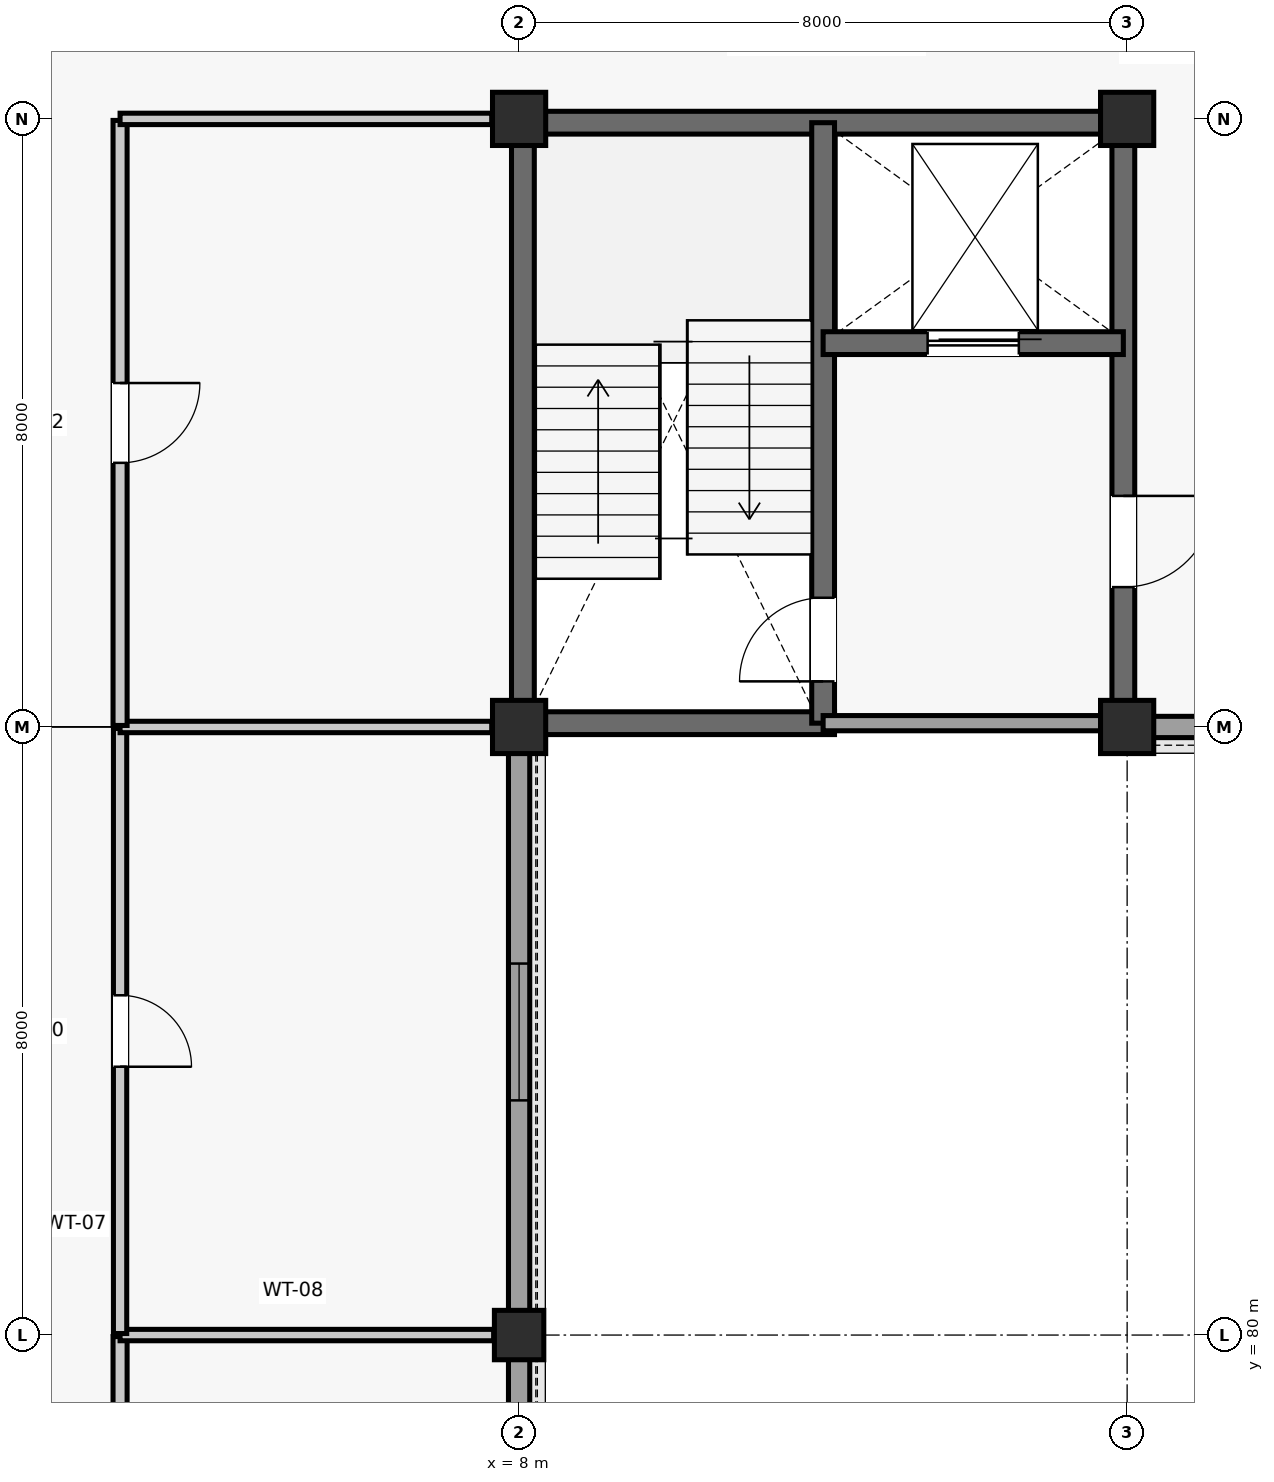
"""IFC4 building model, lengths in metres.
Left out: names, types, materials, properties, quantities, classifications, styles, units other than length and angle.
Written with IfcOpenShell. Run it as: python <this file> out.ifc"""

import sys

from ifc_helpers import new_model, si_unit, direction, frame, frame_2d, origin, origin_2d, place, context, subcontext, project, spatial, rectangle, extrude, element, fill, save


model = new_model("IFC4")
c1 = context("Model", 3, precision=1e-05, world=origin(), true_north=direction((0.0, 1.0)))
c2 = subcontext(c1, "Body", "Model", "MODEL_VIEW")
j1 = project(units=[si_unit("LENGTHUNIT", "METRE"), si_unit("PLANEANGLEUNIT", "RADIAN")], contexts=[c1])
p1 = place(None, origin())
s1 = spatial("IfcSite", under=j1, at=p1, CompositionType="ELEMENT")
p2 = place(p1, origin())
s2 = spatial("IfcBuilding", under=s1, at=p2, CompositionType="ELEMENT")
p3 = place(p2, frame((0.0, 0.0, 13.86)))
s3 = spatial("IfcBuildingStorey", under=s2, at=p3, CompositionType="ELEMENT", Elevation=13.86)
p4 = place(p3, frame((8.0, 80.0, 0.0), z_axis=(0.0, 0.0, 1.0), x_axis=(1.0, 0.0, 0.0)))
e1 = element("IfcColumn", 1, at=p4, inside=s3, PredefinedType="COLUMN", context=c2, shape_type="SweptSolid", body=[
    extrude(rectangle(XDim=0.65, YDim=0.65, at=origin_2d()), origin(), (0.0, 0.0, 1.0), 3.96),
])
for number, where, z_axis, x_axis in (
    (2, (8.0, 88.0, 0.0), (0.0, 0.0, 1.0), (1.0, 0.0, 0.0)),
    (3, (8.0, 96.0, 0.0), (0.0, 0.0, 1.0), (1.0, 0.0, 0.0)),
    (4, (16.0, 88.0, 0.0), (0.0, 0.0, 1.0), (1.0, 0.0, 0.0)),
    (5, (16.0, 96.0, 0.0), (0.0, 0.0, 1.0), (1.0, 0.0, 0.0)),
):
    element("IfcColumn", number, at=place(p3, frame(where, z_axis=z_axis, x_axis=x_axis)), inside=s3, PredefinedType="COLUMN", context=c2, shape_type="SweptSolid", body=[
        extrude(rectangle(XDim=0.7, YDim=0.7, at=origin_2d()), origin(), (0.0, 0.0, 1.0), 3.96),
    ])
p5 = place(p3, frame((8.0, 72.26, 0.0), z_axis=(0.0, 0.0, 1.0), x_axis=(0.0, 1.0, 0.0)))
e6 = element("IfcWall", 6, at=p5, inside=s3, PredefinedType="SOLIDWALL", context=c2, shape_type="SweptSolid", body=[
    extrude(rectangle(XDim=7.43, YDim=0.28, at=frame_2d((3.715, 0.0))), origin(), (0.0, 0.0, 1.0), 3.364),
])
p6 = place(p5, frame((3.115, 0.0, 0.9)))
e7 = element("IfcOpeningElement", 7, at=p6, cuts=e6, PredefinedType="OPENING", context=c2, shape_type="SweptSolid", body=[
    extrude(rectangle(XDim=1.2, YDim=1.8, at=frame_2d((0.6, 0.9))), frame((0.0, 0.15, 0.0), z_axis=(0.0, -1.0, 0.0), x_axis=(1.0, 0.0, 0.0)), (0.0, 0.0, 1.0), 0.3),
])
p7 = place(p3, frame((8.0, 80.31, 0.0), z_axis=(0.0, 0.0, 1.0), x_axis=(0.0, 1.0, 0.0)))
e8 = element("IfcWall", 8, at=p7, inside=s3, PredefinedType="SOLIDWALL", context=c2, shape_type="SweptSolid", body=[
    extrude(rectangle(XDim=7.355, YDim=0.28, at=frame_2d((3.677, 0.0))), origin(), (0.0, 0.0, 1.0), 3.304),
])
p8 = place(p7, frame((2.778, 0.0, 1.35)))
e9 = element("IfcOpeningElement", 9, at=p8, cuts=e8, PredefinedType="OPENING", context=c2, shape_type="SweptSolid", body=[
    extrude(rectangle(XDim=1.8, YDim=1.2, at=frame_2d((0.9, 0.6))), frame((0.0, 0.15, 0.0), z_axis=(0.0, -1.0, 0.0), x_axis=(1.0, 0.0, 0.0)), (0.0, 0.0, 1.0), 0.3),
])
p9 = place(p3, frame((16.335, 88.0, 0.0), z_axis=(0.0, 0.0, 1.0), x_axis=(1.0, 0.0, 0.0)))
e10 = element("IfcWall", 10, at=p9, inside=s3, PredefinedType="SOLIDWALL", context=c2, shape_type="SweptSolid", body=[
    extrude(rectangle(XDim=7.355, YDim=0.28, at=frame_2d((3.677, 0.0))), origin(), (0.0, 0.0, 1.0), 3.3),
])
p10 = place(p9, frame((0.724, 0.0, 0.95)))
e11 = element("IfcOpeningElement", 11, at=p10, cuts=e10, PredefinedType="OPENING", context=c2, shape_type="SweptSolid", body=[
    extrude(rectangle(XDim=1.2, YDim=1.8, at=frame_2d((0.6, 0.9))), frame((0.0, 0.15, 0.0), z_axis=(0.0, -1.0, 0.0), x_axis=(1.0, 0.0, 0.0)), (0.0, 0.0, 1.0), 0.3),
])
p11 = place(p9, frame((5.431, 0.0, 0.95)))
e12 = element("IfcOpeningElement", 12, at=p11, cuts=e10, PredefinedType="OPENING", context=c2, shape_type="SweptSolid", body=[
    extrude(rectangle(XDim=1.2, YDim=1.8, at=frame_2d((0.6, 0.9))), frame((0.0, 0.15, 0.0), z_axis=(0.0, -1.0, 0.0), x_axis=(1.0, 0.0, 0.0)), (0.0, 0.0, 1.0), 0.3),
])
for number, where, z_axis, x_axis in (
    (13, (8.05, 88.24, 0.0), (0.0, 0.0, 1.0), (0.0, 1.0, 0.0)),
    (14, (8.24, 95.95, 0.0), (0.0, 0.0, 1.0), (1.0, 0.0, 0.0)),
):
    element("IfcWall", number, at=place(p3, frame(where, z_axis=z_axis, x_axis=x_axis)), inside=s3, PredefinedType="SHEAR", context=c2, shape_type="SweptSolid", body=[
        extrude(rectangle(XDim=7.52, YDim=0.3, at=frame_2d((3.76, 0.0))), origin(), (0.0, 0.0, 1.0), 3.725),
    ])
p12 = place(p3, frame((15.95, 88.24, 0.0), z_axis=(0.0, 0.0, 1.0), x_axis=(0.0, 1.0, 0.0)))
e15 = element("IfcWall", 15, at=p12, inside=s3, PredefinedType="SHEAR", context=c2, shape_type="SweptSolid", body=[
    extrude(rectangle(XDim=7.52, YDim=0.3, at=frame_2d((3.76, 0.0))), origin(), (0.0, 0.0, 1.0), 3.725),
])
p13 = place(p12, frame((1.6, 0.0, 0.0)))
e16 = element("IfcOpeningElement", 16, at=p13, cuts=e15, PredefinedType="OPENING", context=c2, shape_type="SweptSolid", body=[
    extrude(rectangle(XDim=1.2, YDim=2.15, at=frame_2d((0.6, 1.075))), frame((0.0, 0.16, 0.0), z_axis=(0.0, -1.0, 0.0), x_axis=(1.0, 0.0, 0.0)), (0.0, 0.0, 1.0), 0.32),
])
p14 = place(p3, frame((8.24, 88.05, 0.0), z_axis=(0.0, 0.0, 1.0), x_axis=(1.0, 0.0, 0.0)))
e17 = element("IfcWall", 17, at=p14, inside=s3, PredefinedType="SHEAR", context=c2, shape_type="SweptSolid", body=[
    extrude(rectangle(XDim=3.91, YDim=0.3, at=frame_2d((1.955, 0.0))), origin(), (0.0, 0.0, 1.0), 3.725),
])
p15 = place(p3, frame((12.0, 88.05, 0.0), z_axis=(0.0, 0.0, 1.0), x_axis=(0.0, 1.0, 0.0)))
e18 = element("IfcWall", 18, at=p15, inside=s3, PredefinedType="SHEAR", context=c2, shape_type="SweptSolid", body=[
    extrude(rectangle(XDim=7.9, YDim=0.3, at=frame_2d((3.95, 0.0))), origin(), (0.0, 0.0, 1.0), 3.725),
])
p16 = place(p15, frame((0.55, 0.0, 0.0)))
e19 = element("IfcOpeningElement", 19, at=p16, cuts=e18, PredefinedType="OPENING", context=c2, shape_type="SweptSolid", body=[
    extrude(rectangle(XDim=1.1, YDim=2.15, at=frame_2d((0.55, 1.075))), frame((0.0, 0.16, 0.0), z_axis=(0.0, -1.0, 0.0), x_axis=(1.0, 0.0, 0.0)), (0.0, 0.0, 1.0), 0.32),
])
p17 = place(p3, frame((12.0, 93.05, 0.0), z_axis=(0.0, 0.0, 1.0), x_axis=(1.0, 0.0, 0.0)))
e20 = element("IfcWall", 20, at=p17, inside=s3, PredefinedType="SHEAR", context=c2, shape_type="SweptSolid", body=[
    extrude(rectangle(XDim=3.95, YDim=0.3, at=frame_2d((1.975, 0.0))), origin(), (0.0, 0.0, 1.0), 3.725),
])
p18 = place(p17, frame((1.375, 0.0, 0.0)))
e21 = element("IfcOpeningElement", 21, at=p18, cuts=e20, PredefinedType="OPENING", context=c2, shape_type="SweptSolid", body=[
    extrude(rectangle(XDim=1.2, YDim=2.2, at=frame_2d((0.6, 1.1))), frame((0.0, 0.16, 0.0), z_axis=(0.0, -1.0, 0.0), x_axis=(1.0, 0.0, 0.0)), (0.0, 0.0, 1.0), 0.32),
])
p19 = place(p3, frame((12.0, 88.05, 0.0), z_axis=(0.0, 0.0, 1.0), x_axis=(1.0, 0.0, 0.0)))
e22 = element("IfcWall", 22, at=p19, inside=s3, PredefinedType="PARTITIONING", context=c2, shape_type="SweptSolid", body=[
    extrude(rectangle(XDim=3.66, YDim=0.2, at=frame_2d((1.83, 0.0))), origin(), (0.0, 0.0, 1.0), 3.36),
])
p20 = place(p3, frame((2.75, 72.02, 0.0), z_axis=(0.0, 0.0, 1.0), x_axis=(0.0, 1.0, 0.0)))
e23 = element("IfcWall", 23, at=p20, inside=s3, PredefinedType="PARTITIONING", context=c2, shape_type="SweptSolid", body=[
    extrude(rectangle(XDim=7.96, YDim=0.185, at=frame_2d((3.98, 0.0))), origin(), (0.0, 0.0, 1.0), 3.241),
])
p21 = place(p20, frame((3.355, 0.0, 0.0)))
e24 = element("IfcOpeningElement", 24, at=p21, cuts=e23, PredefinedType="OPENING", context=c2, shape_type="SweptSolid", body=[
    extrude(rectangle(XDim=1.25, YDim=2.18, at=frame_2d((0.625, 1.09))), frame((0.0, 0.103, 0.0), z_axis=(0.0, -1.0, 0.0), x_axis=(1.0, 0.0, 0.0)), (0.0, 0.0, 1.0), 0.205),
])
p22 = place(p3, frame((2.75, 80.0, 0.0), z_axis=(0.0, 0.0, 1.0), x_axis=(1.0, 0.0, 0.0)))
e25 = element("IfcWall", 25, at=p22, inside=s3, PredefinedType="PARTITIONING", context=c2, shape_type="SweptSolid", body=[
    extrude(rectangle(XDim=4.915, YDim=0.15, at=frame_2d((2.458, 0.0))), origin(), (0.0, 0.0, 1.0), 3.241),
])
p23 = place(p3, frame((2.75, 80.02, 0.0), z_axis=(0.0, 0.0, 1.0), x_axis=(0.0, 1.0, 0.0)))
e26 = element("IfcWall", 26, at=p23, inside=s3, PredefinedType="PARTITIONING", context=c2, shape_type="SweptSolid", body=[
    extrude(rectangle(XDim=7.96, YDim=0.175, at=frame_2d((3.98, 0.0))), origin(), (0.0, 0.0, 1.0), 3.241),
])
p24 = place(p23, frame((3.51, 0.0, 0.0)))
e27 = element("IfcOpeningElement", 27, at=p24, cuts=e26, PredefinedType="OPENING", context=c2, shape_type="SweptSolid", body=[
    extrude(rectangle(XDim=0.94, YDim=2.12, at=frame_2d((0.47, 1.06))), frame((0.0, 0.097, 0.0), z_axis=(0.0, -1.0, 0.0), x_axis=(1.0, 0.0, 0.0)), (0.0, 0.0, 1.0), 0.195),
])
p25 = place(p3, frame((2.75, 88.0, 0.0), z_axis=(0.0, 0.0, 1.0), x_axis=(1.0, 0.0, 0.0)))
e28 = element("IfcWall", 28, at=p25, inside=s3, PredefinedType="PARTITIONING", context=c2, shape_type="SweptSolid", body=[
    extrude(rectangle(XDim=4.89, YDim=0.15, at=frame_2d((2.445, 0.0))), origin(), (0.0, 0.0, 1.0), 3.452),
])
p26 = place(p3, frame((2.75, 88.02, 0.0), z_axis=(0.0, 0.0, 1.0), x_axis=(0.0, 1.0, 0.0)))
e29 = element("IfcWall", 29, at=p26, inside=s3, PredefinedType="PARTITIONING", context=c2, shape_type="SweptSolid", body=[
    extrude(rectangle(XDim=7.96, YDim=0.185, at=frame_2d((3.98, 0.0))), origin(), (0.0, 0.0, 1.0), 3.247),
])
p27 = place(p26, frame((3.455, 0.0, 0.0)))
e30 = element("IfcOpeningElement", 30, at=p27, cuts=e29, PredefinedType="OPENING", context=c2, shape_type="SweptSolid", body=[
    extrude(rectangle(XDim=1.05, YDim=2.15, at=frame_2d((0.525, 1.075))), frame((0.0, 0.103, 0.0), z_axis=(0.0, -1.0, 0.0), x_axis=(1.0, 0.0, 0.0)), (0.0, 0.0, 1.0), 0.205),
])
p28 = place(p3, frame((2.75, 96.0, 0.0), z_axis=(0.0, 0.0, 1.0), x_axis=(1.0, 0.0, 0.0)))
e31 = element("IfcWall", 31, at=p28, inside=s3, PredefinedType="PARTITIONING", context=c2, shape_type="SweptSolid", body=[
    extrude(rectangle(XDim=4.89, YDim=0.15, at=frame_2d((2.445, 0.0))), origin(), (0.0, 0.0, 1.0), 3.247),
])
p29 = place(p8, origin())
e32 = element("IfcWindow", 32, at=p29, inside=s3, PartitioningType="SINGLE_PANEL", PredefinedType="WINDOW", context=c2, shape_type="SweptSolid", body=[
    extrude(rectangle(XDim=1.8, YDim=1.2, at=frame_2d((0.9, 0.6))), frame((0.0, 0.03, 0.0), z_axis=(0.0, -1.0, 0.0), x_axis=(1.0, 0.0, 0.0)), (0.0, 0.0, 1.0), 0.06),
])
fill(e9, e32)
p30 = place(p16, origin())
e33 = element("IfcDoor", 33, at=p30, inside=s3, OperationType="SINGLE_SWING_LEFT", PredefinedType="DOOR", context=c2, shape_type="SweptSolid", body=[
    extrude(rectangle(XDim=1.1, YDim=2.15, at=frame_2d((0.55, 1.075))), frame((0.0, 0.025, 0.0), z_axis=(0.0, -1.0, 0.0), x_axis=(1.0, 0.0, 0.0)), (0.0, 0.0, 1.0), 0.05),
])
fill(e19, e33)
p31 = place(p18, origin())
e34 = element("IfcDoor", 34, at=p31, inside=s3, OperationType="SLIDING_TO_LEFT", PredefinedType="DOOR", context=c2, shape_type="SweptSolid", body=[
    extrude(rectangle(XDim=1.2, YDim=2.2, at=frame_2d((0.6, 1.1))), frame((0.0, 0.025, 0.0), z_axis=(0.0, -1.0, 0.0), x_axis=(1.0, 0.0, 0.0)), (0.0, 0.0, 1.0), 0.05),
])
fill(e21, e34)
p32 = place(p13, frame((1.2, 0.0, 0.0), z_axis=(0.0, 0.0, 1.0), x_axis=(-1.0, 0.0, 0.0)))
e35 = element("IfcDoor", 35, at=p32, inside=s3, OperationType="SINGLE_SWING_RIGHT", PredefinedType="DOOR", context=c2, shape_type="SweptSolid", body=[
    extrude(rectangle(XDim=1.2, YDim=2.15, at=frame_2d((0.6, 1.075))), frame((0.0, 0.025, 0.0), z_axis=(0.0, -1.0, 0.0), x_axis=(1.0, 0.0, 0.0)), (0.0, 0.0, 1.0), 0.05),
])
fill(e16, e35)
p33 = place(p24, frame((0.94, 0.0, 0.0), z_axis=(0.0, 0.0, 1.0), x_axis=(-1.0, 0.0, 0.0)))
e36 = element("IfcDoor", 36, at=p33, inside=s3, OperationType="SINGLE_SWING_LEFT", PredefinedType="DOOR", context=c2, shape_type="SweptSolid", body=[
    extrude(rectangle(XDim=0.94, YDim=2.12, at=frame_2d((0.47, 1.06))), frame((0.0, 0.025, 0.0), z_axis=(0.0, -1.0, 0.0), x_axis=(1.0, 0.0, 0.0)), (0.0, 0.0, 1.0), 0.05),
])
fill(e27, e36)
p34 = place(p27, frame((1.05, 0.0, 0.0), z_axis=(0.0, 0.0, 1.0), x_axis=(-1.0, 0.0, 0.0)))
e37 = element("IfcDoor", 37, at=p34, inside=s3, OperationType="SINGLE_SWING_RIGHT", PredefinedType="DOOR", context=c2, shape_type="SweptSolid", body=[
    extrude(rectangle(XDim=1.05, YDim=2.15, at=frame_2d((0.525, 1.075))), frame((0.0, 0.025, 0.0), z_axis=(0.0, -1.0, 0.0), x_axis=(1.0, 0.0, 0.0)), (0.0, 0.0, 1.0), 0.05),
])
fill(e30, e37)
save(model, sys.argv[1])
